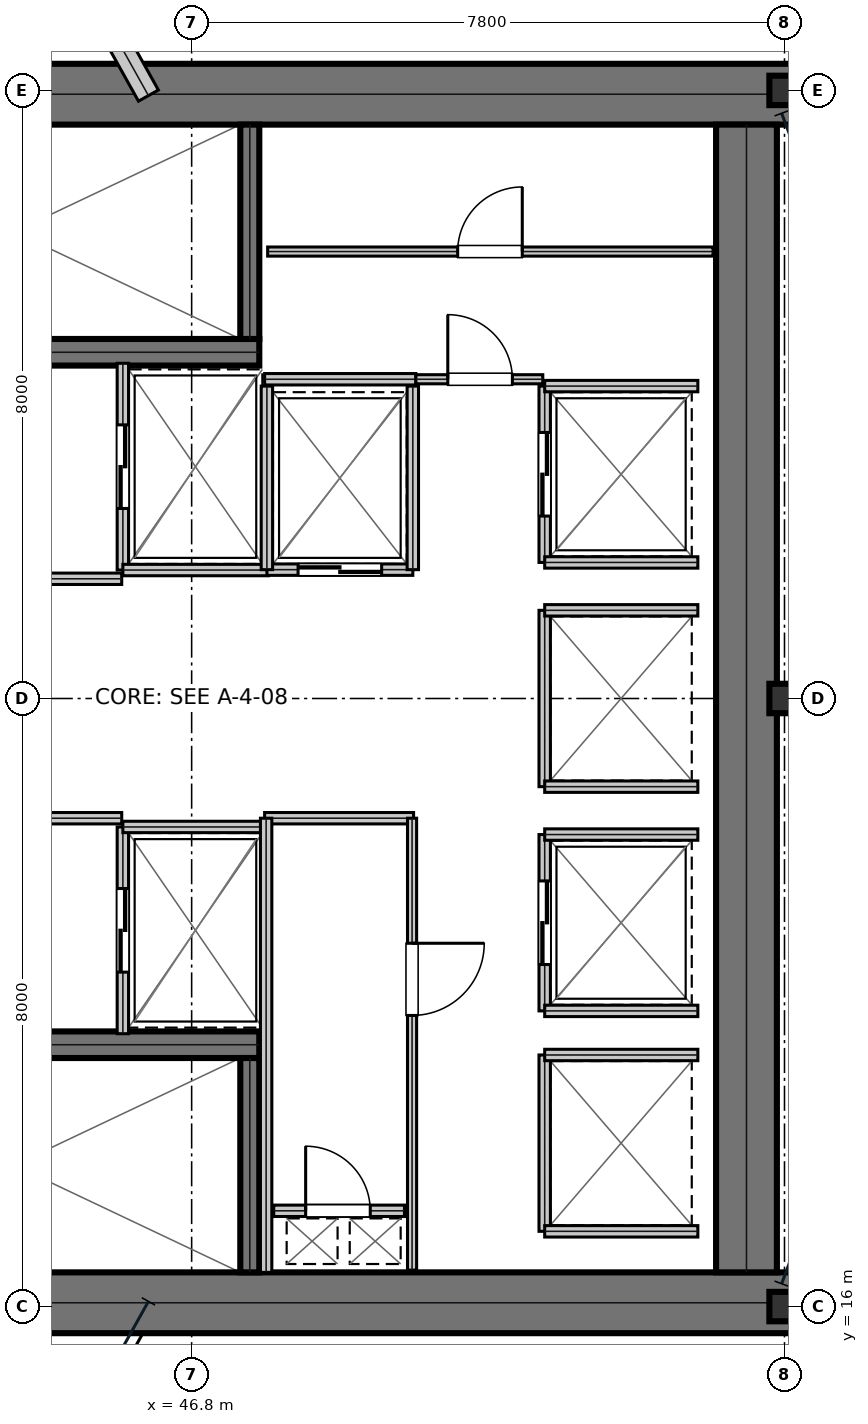
"""IFC4 building model, lengths in metres.
Left out: names, types, materials, properties, quantities, classifications, styles, units other than length and angle.
Written with IfcOpenShell. Run it as: python <this file> out.ifc"""

import sys

from ifc_helpers import new_model, si_unit, direction, frame, frame_2d, origin, origin_2d, place, context, subcontext, project, spatial, rectangle, i_section, extrude, element, fill, save


model = new_model("IFC4")
c1 = context("Model", 3, precision=1e-05, world=origin(), true_north=direction((0.0, 1.0)))
c2 = subcontext(c1, "Body", "Model", "MODEL_VIEW")
j1 = project(units=[si_unit("LENGTHUNIT", "METRE"), si_unit("PLANEANGLEUNIT", "RADIAN")], contexts=[c1])
p1 = place(None, origin())
s1 = spatial("IfcSite", under=j1, at=p1, CompositionType="ELEMENT")
p2 = place(p1, origin())
s2 = spatial("IfcBuilding", under=s1, at=p2, CompositionType="ELEMENT")
p3 = place(p2, frame((0.0, 0.0, 161.4)))
s3 = spatial("IfcBuildingStorey", under=s2, at=p3, CompositionType="ELEMENT", Elevation=161.4)
for number, where, z_axis, x_axis in (
    (1, (38.8, 31.95, 0.0), (0.0, 0.0, 1.0), (1.0, 0.0, 0.0)),
    (2, (38.8, 16.05, 0.0), (0.0, 0.0, 1.0), (1.0, 0.0, 0.0)),
):
    element("IfcWall", number, at=place(p3, frame(where, z_axis=z_axis, x_axis=x_axis)), inside=s3, PredefinedType="SHEAR", context=c2, shape_type="SweptSolid", body=[
        extrude(rectangle(XDim=16.0, YDim=0.8, at=frame_2d((8.0, 0.0))), origin(), (0.0, 0.0, 1.0), 3.81),
    ])
p4 = place(p3, frame((54.1, 16.45, 0.0), z_axis=(0.0, 0.0, 1.0), x_axis=(0.0, 1.0, 0.0)))
e3 = element("IfcWall", 3, at=p4, inside=s3, PredefinedType="SHEAR", context=c2, shape_type="SweptSolid", body=[
    extrude(rectangle(XDim=15.1, YDim=0.8, at=frame_2d((7.55, 0.0))), origin(), (0.0, 0.0, 1.0), 3.81),
])
p5 = place(p3, frame((39.98, 28.555, 0.0), z_axis=(0.0, 0.0, 1.0), x_axis=(1.0, 0.0, 0.0)))
e4 = element("IfcWall", 4, at=p5, inside=s3, PredefinedType="SHEAR", context=c2, shape_type="SweptSolid", body=[
    extrude(rectangle(XDim=7.71, YDim=0.35, at=frame_2d((3.855, 0.0))), origin(), (0.0, 0.0, 1.0), 3.81),
])
p6 = place(p5, frame((0.25, 0.0, 0.0)))
e5 = element("IfcOpeningElement", 5, at=p6, cuts=e4, PredefinedType="OPENING", context=c2, shape_type="SweptSolid", body=[
    extrude(rectangle(XDim=1.1, YDim=2.15, at=frame_2d((0.55, 1.075))), frame((0.0, 0.185, 0.0), z_axis=(0.0, -1.0, 0.0), x_axis=(1.0, 0.0, 0.0)), (0.0, 0.0, 1.0), 0.37),
])
p7 = place(p3, frame((39.98, 19.445, 0.0), z_axis=(0.0, 0.0, 1.0), x_axis=(1.0, 0.0, 0.0)))
e6 = element("IfcWall", 6, at=p7, inside=s3, PredefinedType="SHEAR", context=c2, shape_type="SweptSolid", body=[
    extrude(rectangle(XDim=7.71, YDim=0.35, at=frame_2d((3.855, 0.0))), origin(), (0.0, 0.0, 1.0), 3.81),
])
p8 = place(p7, frame((0.25, 0.0, 0.0)))
e7 = element("IfcOpeningElement", 7, at=p8, cuts=e6, PredefinedType="OPENING", context=c2, shape_type="SweptSolid", body=[
    extrude(rectangle(XDim=1.1, YDim=2.15, at=frame_2d((0.55, 1.075))), frame((0.0, 0.185, 0.0), z_axis=(0.0, -1.0, 0.0), x_axis=(1.0, 0.0, 0.0)), (0.0, 0.0, 1.0), 0.37),
])
for number, where, z_axis, x_axis in (
    (8, (47.565, 28.73, 0.0), (0.0, 0.0, 1.0), (0.0, 1.0, 0.0)),
    (9, (47.565, 16.45, 0.0), (0.0, 0.0, 1.0), (0.0, 1.0, 0.0)),
):
    element("IfcWall", number, at=place(p3, frame(where, z_axis=z_axis, x_axis=x_axis)), inside=s3, PredefinedType="SHEAR", context=c2, shape_type="SweptSolid", body=[
        extrude(rectangle(XDim=2.82, YDim=0.25, at=frame_2d((1.41, 0.0))), origin(), (0.0, 0.0, 1.0), 3.81),
    ])
for number, where, z_axis, x_axis in (
    (10, (54.6, 16.0, 0.0), (0.0, 0.0, 1.0), (1.0, 0.0, 0.0)),
    (11, (54.6, 24.0, 0.0), (0.0, 0.0, 1.0), (1.0, 0.0, 0.0)),
    (12, (54.6, 32.0, 0.0), (0.0, 0.0, 1.0), (1.0, 0.0, 0.0)),
):
    element("IfcColumn", number, at=place(p3, frame(where, z_axis=z_axis, x_axis=x_axis)), inside=s3, PredefinedType="COLUMN", context=c2, shape_type="SweptSolid", body=[
        extrude(i_section(OverallWidth=0.398, OverallDepth=0.387, WebThickness=0.021, FlangeThickness=0.033, at=origin_2d()), origin(), (0.0, 0.0, 1.0), 4.044),
    ])
p9 = place(p3, frame((46.231, 31.932, 0.0), z_axis=(0.0, 0.0, 1.0), x_axis=(-0.487234407079, 0.873271225083, 0.0)))
e13 = element("IfcWall", 13, at=p9, inside=s3, PredefinedType="STANDARD", context=c2, shape_type="SweptSolid", body=[
    extrude(rectangle(XDim=6.145, YDim=0.3, at=frame_2d((3.072, 0.0))), origin(), (0.0, 0.0, 1.0), 3.338),
])
p10 = place(p3, frame((39.98, 25.575, 0.0), z_axis=(0.0, 0.0, 1.0), x_axis=(1.0, 0.0, 0.0)))
e14 = element("IfcWall", 14, at=p10, inside=s3, PredefinedType="PARTITIONING", context=c2, shape_type="SweptSolid", body=[
    extrude(rectangle(XDim=5.9, YDim=0.15, at=frame_2d((2.95, 0.0))), origin(), (0.0, 0.0, 1.0), 3.81),
])
p11 = place(p10, frame((2.35, 0.0, 0.0)))
e15 = element("IfcOpeningElement", 15, at=p11, cuts=e14, PredefinedType="OPENING", context=c2, shape_type="SweptSolid", body=[
    extrude(rectangle(XDim=1.05, YDim=2.15, at=frame_2d((0.525, 1.075))), frame((0.0, 0.085, 0.0), z_axis=(0.0, -1.0, 0.0), x_axis=(1.0, 0.0, 0.0)), (0.0, 0.0, 1.0), 0.17),
])
p12 = place(p3, frame((39.98, 22.425, 0.0), z_axis=(0.0, 0.0, 1.0), x_axis=(1.0, 0.0, 0.0)))
e16 = element("IfcWall", 16, at=p12, inside=s3, PredefinedType="PARTITIONING", context=c2, shape_type="SweptSolid", body=[
    extrude(rectangle(XDim=5.9, YDim=0.15, at=frame_2d((2.95, 0.0))), origin(), (0.0, 0.0, 1.0), 3.81),
])
p13 = place(p12, frame((2.35, 0.0, 0.0)))
e17 = element("IfcOpeningElement", 17, at=p13, cuts=e16, PredefinedType="OPENING", context=c2, shape_type="SweptSolid", body=[
    extrude(rectangle(XDim=1.05, YDim=2.15, at=frame_2d((0.525, 1.075))), frame((0.0, 0.085, 0.0), z_axis=(0.0, -1.0, 0.0), x_axis=(1.0, 0.0, 0.0)), (0.0, 0.0, 1.0), 0.17),
])
p14 = place(p3, frame((45.895, 25.69, 0.0), z_axis=(0.0, 0.0, 1.0), x_axis=(0.0, 1.0, 0.0)))
e18 = element("IfcWall", 18, at=p14, inside=s3, PredefinedType="PARTITIONING", context=c2, shape_type="SweptSolid", body=[
    extrude(rectangle(XDim=2.72, YDim=0.15, at=frame_2d((1.36, 0.0))), origin(), (0.0, 0.0, 1.0), 3.81),
])
p15 = place(p14, frame((0.81, 0.0, 0.0)))
e19 = element("IfcOpeningElement", 19, at=p15, cuts=e18, PredefinedType="OPENING", context=c2, shape_type="SweptSolid", body=[
    extrude(rectangle(XDim=1.1, YDim=2.15, at=frame_2d((0.55, 1.075))), frame((0.0, 0.085, 0.0), z_axis=(0.0, -1.0, 0.0), x_axis=(1.0, 0.0, 0.0)), (0.0, 0.0, 1.0), 0.17),
])
p16 = place(p3, frame((45.895, 25.69, 0.0), z_axis=(0.0, 0.0, 1.0), x_axis=(1.0, 0.0, 0.0)))
e20 = element("IfcWall", 20, at=p16, inside=s3, PredefinedType="PARTITIONING", context=c2, shape_type="SweptSolid", body=[
    extrude(rectangle(XDim=1.915, YDim=0.15, at=frame_2d((0.958, 0.0))), origin(), (0.0, 0.0, 1.0), 3.81),
])
p17 = place(p3, frame((45.895, 19.59, 0.0), z_axis=(0.0, 0.0, 1.0), x_axis=(0.0, 1.0, 0.0)))
e21 = element("IfcWall", 21, at=p17, inside=s3, PredefinedType="PARTITIONING", context=c2, shape_type="SweptSolid", body=[
    extrude(rectangle(XDim=2.72, YDim=0.15, at=frame_2d((1.36, 0.0))), origin(), (0.0, 0.0, 1.0), 3.81),
])
p18 = place(p17, frame((0.81, 0.0, 0.0)))
e22 = element("IfcOpeningElement", 22, at=p18, cuts=e21, PredefinedType="OPENING", context=c2, shape_type="SweptSolid", body=[
    extrude(rectangle(XDim=1.1, YDim=2.15, at=frame_2d((0.55, 1.075))), frame((0.0, 0.085, 0.0), z_axis=(0.0, -1.0, 0.0), x_axis=(1.0, 0.0, 0.0)), (0.0, 0.0, 1.0), 0.17),
])
p19 = place(p3, frame((45.895, 22.31, 0.0), z_axis=(0.0, 0.0, 1.0), x_axis=(1.0, 0.0, 0.0)))
e23 = element("IfcWall", 23, at=p19, inside=s3, PredefinedType="PARTITIONING", context=c2, shape_type="SweptSolid", body=[
    extrude(rectangle(XDim=1.915, YDim=0.15, at=frame_2d((0.958, 0.0))), origin(), (0.0, 0.0, 1.0), 3.81),
])
p20 = place(p3, frame((47.79, 25.695, 0.0), z_axis=(0.0, 0.0, 1.0), x_axis=(1.0, 0.0, 0.0)))
e24 = element("IfcWall", 24, at=p20, inside=s3, PredefinedType="PARTITIONING", context=c2, shape_type="SweptSolid", body=[
    extrude(rectangle(XDim=1.92, YDim=0.15, at=frame_2d((0.96, 0.0))), origin(), (0.0, 0.0, 1.0), 3.81),
])
p21 = place(p20, frame((0.41, 0.0, 0.0)))
e25 = element("IfcOpeningElement", 25, at=p21, cuts=e24, PredefinedType="OPENING", context=c2, shape_type="SweptSolid", body=[
    extrude(rectangle(XDim=1.1, YDim=2.15, at=frame_2d((0.55, 1.075))), frame((0.0, 0.085, 0.0), z_axis=(0.0, -1.0, 0.0), x_axis=(1.0, 0.0, 0.0)), (0.0, 0.0, 1.0), 0.17),
])
for number, where, z_axis, x_axis in (
    (26, (47.79, 25.695, 0.0), (0.0, 0.0, 1.0), (0.0, 1.0, 0.0)),
    (27, (49.71, 25.695, 0.0), (0.0, 0.0, 1.0), (0.0, 1.0, 0.0)),
):
    element("IfcWall", number, at=place(p3, frame(where, z_axis=z_axis, x_axis=x_axis)), inside=s3, PredefinedType="PARTITIONING", context=c2, shape_type="SweptSolid", body=[
        extrude(rectangle(XDim=2.415, YDim=0.15, at=frame_2d((1.208, 0.0))), origin(), (0.0, 0.0, 1.0), 3.81),
    ])
p22 = place(p3, frame((51.445, 25.79, 0.0), z_axis=(0.0, 0.0, 1.0), x_axis=(0.0, 1.0, 0.0)))
e28 = element("IfcWall", 28, at=p22, inside=s3, PredefinedType="PARTITIONING", context=c2, shape_type="SweptSolid", body=[
    extrude(rectangle(XDim=2.32, YDim=0.15, at=frame_2d((1.16, 0.0))), origin(), (0.0, 0.0, 1.0), 3.81),
])
p23 = place(p22, frame((0.61, 0.0, 0.0)))
e29 = element("IfcOpeningElement", 29, at=p23, cuts=e28, PredefinedType="OPENING", context=c2, shape_type="SweptSolid", body=[
    extrude(rectangle(XDim=1.1, YDim=2.15, at=frame_2d((0.55, 1.075))), frame((0.0, 0.085, 0.0), z_axis=(0.0, -1.0, 0.0), x_axis=(1.0, 0.0, 0.0)), (0.0, 0.0, 1.0), 0.17),
])
for number, where, z_axis, x_axis in (
    (30, (51.445, 25.79, 0.0), (0.0, 0.0, 1.0), (1.0, 0.0, 0.0)),
    (31, (51.445, 28.11, 0.0), (0.0, 0.0, 1.0), (1.0, 0.0, 0.0)),
):
    element("IfcWall", number, at=place(p3, frame(where, z_axis=z_axis, x_axis=x_axis)), inside=s3, PredefinedType="PARTITIONING", context=c2, shape_type="SweptSolid", body=[
        extrude(rectangle(XDim=2.015, YDim=0.15, at=frame_2d((1.007, 0.0))), origin(), (0.0, 0.0, 1.0), 3.81),
    ])
p24 = place(p3, frame((51.445, 19.89, 0.0), z_axis=(0.0, 0.0, 1.0), x_axis=(0.0, 1.0, 0.0)))
e32 = element("IfcWall", 32, at=p24, inside=s3, PredefinedType="PARTITIONING", context=c2, shape_type="SweptSolid", body=[
    extrude(rectangle(XDim=2.32, YDim=0.15, at=frame_2d((1.16, 0.0))), origin(), (0.0, 0.0, 1.0), 3.81),
])
p25 = place(p24, frame((0.61, 0.0, 0.0)))
e33 = element("IfcOpeningElement", 33, at=p25, cuts=e32, PredefinedType="OPENING", context=c2, shape_type="SweptSolid", body=[
    extrude(rectangle(XDim=1.1, YDim=2.15, at=frame_2d((0.55, 1.075))), frame((0.0, 0.085, 0.0), z_axis=(0.0, -1.0, 0.0), x_axis=(1.0, 0.0, 0.0)), (0.0, 0.0, 1.0), 0.17),
])
for number, where, z_axis, x_axis in (
    (34, (51.445, 19.89, 0.0), (0.0, 0.0, 1.0), (1.0, 0.0, 0.0)),
    (35, (51.445, 22.21, 0.0), (0.0, 0.0, 1.0), (1.0, 0.0, 0.0)),
):
    element("IfcWall", number, at=place(p3, frame(where, z_axis=z_axis, x_axis=x_axis)), inside=s3, PredefinedType="PARTITIONING", context=c2, shape_type="SweptSolid", body=[
        extrude(rectangle(XDim=2.015, YDim=0.15, at=frame_2d((1.007, 0.0))), origin(), (0.0, 0.0, 1.0), 3.81),
    ])
p26 = place(p3, frame((51.445, 22.84, 0.0), z_axis=(0.0, 0.0, 1.0), x_axis=(0.0, 1.0, 0.0)))
e36 = element("IfcWall", 36, at=p26, inside=s3, PredefinedType="PARTITIONING", context=c2, shape_type="SweptSolid", body=[
    extrude(rectangle(XDim=2.32, YDim=0.15, at=frame_2d((1.16, 0.0))), origin(), (0.0, 0.0, 1.0), 3.81),
])
for number, where, z_axis, x_axis in (
    (37, (51.445, 22.84, 0.0), (0.0, 0.0, 1.0), (1.0, 0.0, 0.0)),
    (38, (51.445, 25.16, 0.0), (0.0, 0.0, 1.0), (1.0, 0.0, 0.0)),
):
    element("IfcWall", number, at=place(p3, frame(where, z_axis=z_axis, x_axis=x_axis)), inside=s3, PredefinedType="PARTITIONING", context=c2, shape_type="SweptSolid", body=[
        extrude(rectangle(XDim=2.015, YDim=0.15, at=frame_2d((1.007, 0.0))), origin(), (0.0, 0.0, 1.0), 3.81),
    ])
p27 = place(p3, frame((51.445, 16.99, 0.0), z_axis=(0.0, 0.0, 1.0), x_axis=(0.0, 1.0, 0.0)))
e39 = element("IfcWall", 39, at=p27, inside=s3, PredefinedType="PARTITIONING", context=c2, shape_type="SweptSolid", body=[
    extrude(rectangle(XDim=2.32, YDim=0.15, at=frame_2d((1.16, 0.0))), origin(), (0.0, 0.0, 1.0), 3.81),
])
for number, where, z_axis, x_axis in (
    (40, (51.445, 16.99, 0.0), (0.0, 0.0, 1.0), (1.0, 0.0, 0.0)),
    (41, (51.445, 19.31, 0.0), (0.0, 0.0, 1.0), (1.0, 0.0, 0.0)),
):
    element("IfcWall", number, at=place(p3, frame(where, z_axis=z_axis, x_axis=x_axis)), inside=s3, PredefinedType="PARTITIONING", context=c2, shape_type="SweptSolid", body=[
        extrude(rectangle(XDim=2.015, YDim=0.15, at=frame_2d((1.007, 0.0))), origin(), (0.0, 0.0, 1.0), 3.81),
    ])
p28 = place(p3, frame((47.88, 17.26, 0.0), z_axis=(0.0, 0.0, 1.0), x_axis=(1.0, 0.0, 0.0)))
e42 = element("IfcWall", 42, at=p28, inside=s3, PredefinedType="PARTITIONING", context=c2, shape_type="SweptSolid", body=[
    extrude(rectangle(XDim=1.72, YDim=0.15, at=frame_2d((0.86, 0.0))), origin(), (0.0, 0.0, 1.0), 3.81),
])
p29 = place(p28, frame((0.42, 0.0, 0.0)))
e43 = element("IfcOpeningElement", 43, at=p29, cuts=e42, PredefinedType="OPENING", context=c2, shape_type="SweptSolid", body=[
    extrude(rectangle(XDim=0.85, YDim=2.15, at=frame_2d((0.425, 1.075))), frame((0.0, 0.085, 0.0), z_axis=(0.0, -1.0, 0.0), x_axis=(1.0, 0.0, 0.0)), (0.0, 0.0, 1.0), 0.17),
])
p30 = place(p3, frame((47.76, 22.425, 0.0), z_axis=(0.0, 0.0, 1.0), x_axis=(1.0, 0.0, 0.0)))
e44 = element("IfcWall", 44, at=p30, inside=s3, PredefinedType="PARTITIONING", context=c2, shape_type="SweptSolid", body=[
    extrude(rectangle(XDim=1.96, YDim=0.15, at=frame_2d((0.98, 0.0))), origin(), (0.0, 0.0, 1.0), 3.81),
])
p31 = place(p3, frame((47.78, 16.45, 0.0), z_axis=(0.0, 0.0, 1.0), x_axis=(0.0, 1.0, 0.0)))
e45 = element("IfcWall", 45, at=p31, inside=s3, PredefinedType="PARTITIONING", context=c2, shape_type="SweptSolid", body=[
    extrude(rectangle(XDim=5.975, YDim=0.15, at=frame_2d((2.988, 0.0))), origin(), (0.0, 0.0, 1.0), 3.81),
])
p32 = place(p3, frame((49.7, 16.48, 0.0), z_axis=(0.0, 0.0, 1.0), x_axis=(0.0, 1.0, 0.0)))
e46 = element("IfcWall", 46, at=p32, inside=s3, PredefinedType="PARTITIONING", context=c2, shape_type="SweptSolid", body=[
    extrude(rectangle(XDim=5.945, YDim=0.12, at=frame_2d((2.973, 0.0))), origin(), (0.0, 0.0, 1.0), 3.81),
])
p33 = place(p32, frame((3.35, 0.0, 0.0)))
e47 = element("IfcOpeningElement", 47, at=p33, cuts=e46, PredefinedType="OPENING", context=c2, shape_type="SweptSolid", body=[
    extrude(rectangle(XDim=0.95, YDim=2.15, at=frame_2d((0.475, 1.075))), frame((0.0, 0.07, 0.0), z_axis=(0.0, -1.0, 0.0), x_axis=(1.0, 0.0, 0.0)), (0.0, 0.0, 1.0), 0.14),
])
p34 = place(p3, frame((47.76, 28.2, 0.0), z_axis=(0.0, 0.0, 1.0), x_axis=(1.0, 0.0, 0.0)))
e48 = element("IfcWall", 48, at=p34, inside=s3, PredefinedType="PARTITIONING", context=c2, shape_type="SweptSolid", body=[
    extrude(rectangle(XDim=1.99, YDim=0.15, at=frame_2d((0.995, 0.0))), origin(), (0.0, 0.0, 1.0), 3.81),
])
p35 = place(p3, frame((49.75, 28.2, 0.0), z_axis=(0.0, 0.0, 1.0), x_axis=(1.0, 0.0, 0.0)))
e49 = element("IfcWall", 49, at=p35, inside=s3, PredefinedType="PARTITIONING", context=c2, shape_type="SweptSolid", body=[
    extrude(rectangle(XDim=1.67, YDim=0.12, at=frame_2d((0.835, 0.0))), origin(), (0.0, 0.0, 1.0), 3.81),
])
p36 = place(p35, frame((0.42, 0.0, 0.0)))
e50 = element("IfcOpeningElement", 50, at=p36, cuts=e49, PredefinedType="OPENING", context=c2, shape_type="SweptSolid", body=[
    extrude(rectangle(XDim=0.85, YDim=2.15, at=frame_2d((0.425, 1.075))), frame((0.0, 0.07, 0.0), z_axis=(0.0, -1.0, 0.0), x_axis=(1.0, 0.0, 0.0)), (0.0, 0.0, 1.0), 0.14),
])
p37 = place(p3, frame((47.8, 29.88, 0.0), z_axis=(0.0, 0.0, 1.0), x_axis=(1.0, 0.0, 0.0)))
e51 = element("IfcWall", 51, at=p37, inside=s3, PredefinedType="PARTITIONING", context=c2, shape_type="SweptSolid", body=[
    extrude(rectangle(XDim=5.86, YDim=0.12, at=frame_2d((2.93, 0.0))), origin(), (0.0, 0.0, 1.0), 3.81),
])
p38 = place(p37, frame((2.5, 0.0, 0.0)))
e52 = element("IfcOpeningElement", 52, at=p38, cuts=e51, PredefinedType="OPENING", context=c2, shape_type="SweptSolid", body=[
    extrude(rectangle(XDim=0.85, YDim=2.15, at=frame_2d((0.425, 1.075))), frame((0.0, 0.07, 0.0), z_axis=(0.0, -1.0, 0.0), x_axis=(1.0, 0.0, 0.0)), (0.0, 0.0, 1.0), 0.14),
])
p39 = place(p15, frame((1.1, 0.0, 0.0), z_axis=(0.0, 0.0, 1.0), x_axis=(-1.0, 0.0, 0.0)))
e53 = element("IfcDoor", 53, at=p39, inside=s3, OperationType="DOUBLE_DOOR_SLIDING", PredefinedType="DOOR", context=c2, shape_type="SweptSolid", body=[
    extrude(rectangle(XDim=1.1, YDim=2.15, at=frame_2d((0.55, 1.075))), frame((0.0, 0.025, 0.0), z_axis=(0.0, -1.0, 0.0), x_axis=(1.0, 0.0, 0.0)), (0.0, 0.0, 1.0), 0.05),
])
fill(e19, e53)
p40 = place(p18, frame((1.1, 0.0, 0.0), z_axis=(0.0, 0.0, 1.0), x_axis=(-1.0, 0.0, 0.0)))
e54 = element("IfcDoor", 54, at=p40, inside=s3, OperationType="DOUBLE_DOOR_SLIDING", PredefinedType="DOOR", context=c2, shape_type="SweptSolid", body=[
    extrude(rectangle(XDim=1.1, YDim=2.15, at=frame_2d((0.55, 1.075))), frame((0.0, 0.025, 0.0), z_axis=(0.0, -1.0, 0.0), x_axis=(1.0, 0.0, 0.0)), (0.0, 0.0, 1.0), 0.05),
])
fill(e22, e54)
p41 = place(p21, frame((1.1, 0.0, 0.0), z_axis=(0.0, 0.0, 1.0), x_axis=(-1.0, 0.0, 0.0)))
e55 = element("IfcDoor", 55, at=p41, inside=s3, OperationType="DOUBLE_DOOR_SLIDING", PredefinedType="DOOR", context=c2, shape_type="SweptSolid", body=[
    extrude(rectangle(XDim=1.1, YDim=2.15, at=frame_2d((0.55, 1.075))), frame((0.0, 0.025, 0.0), z_axis=(0.0, -1.0, 0.0), x_axis=(1.0, 0.0, 0.0)), (0.0, 0.0, 1.0), 0.05),
])
fill(e25, e55)
p42 = place(p23, frame((1.1, 0.0, 0.0), z_axis=(0.0, 0.0, 1.0), x_axis=(-1.0, 0.0, 0.0)))
e56 = element("IfcDoor", 56, at=p42, inside=s3, OperationType="DOUBLE_DOOR_SLIDING", PredefinedType="DOOR", context=c2, shape_type="SweptSolid", body=[
    extrude(rectangle(XDim=1.1, YDim=2.15, at=frame_2d((0.55, 1.075))), frame((0.0, 0.025, 0.0), z_axis=(0.0, -1.0, 0.0), x_axis=(1.0, 0.0, 0.0)), (0.0, 0.0, 1.0), 0.05),
])
fill(e29, e56)
p43 = place(p25, frame((1.1, 0.0, 0.0), z_axis=(0.0, 0.0, 1.0), x_axis=(-1.0, 0.0, 0.0)))
e57 = element("IfcDoor", 57, at=p43, inside=s3, OperationType="DOUBLE_DOOR_SLIDING", PredefinedType="DOOR", context=c2, shape_type="SweptSolid", body=[
    extrude(rectangle(XDim=1.1, YDim=2.15, at=frame_2d((0.55, 1.075))), frame((0.0, 0.025, 0.0), z_axis=(0.0, -1.0, 0.0), x_axis=(1.0, 0.0, 0.0)), (0.0, 0.0, 1.0), 0.05),
])
fill(e33, e57)
p44 = place(p29, origin())
e58 = element("IfcDoor", 58, at=p44, inside=s3, OperationType="SINGLE_SWING_LEFT", PredefinedType="TRAPDOOR", context=c2, shape_type="SweptSolid", body=[
    extrude(rectangle(XDim=0.85, YDim=2.15, at=frame_2d((0.425, 1.075))), frame((0.0, 0.025, 0.0), z_axis=(0.0, -1.0, 0.0), x_axis=(1.0, 0.0, 0.0)), (0.0, 0.0, 1.0), 0.05),
])
fill(e43, e58)
p45 = place(p33, frame((0.95, 0.0, 0.0), z_axis=(0.0, 0.0, 1.0), x_axis=(-1.0, 0.0, 0.0)))
e59 = element("IfcDoor", 59, at=p45, inside=s3, OperationType="SINGLE_SWING_LEFT", PredefinedType="DOOR", context=c2, shape_type="SweptSolid", body=[
    extrude(rectangle(XDim=0.95, YDim=2.15, at=frame_2d((0.475, 1.075))), frame((0.0, 0.025, 0.0), z_axis=(0.0, -1.0, 0.0), x_axis=(1.0, 0.0, 0.0)), (0.0, 0.0, 1.0), 0.05),
])
fill(e47, e59)
p46 = place(p36, origin())
e60 = element("IfcDoor", 60, at=p46, inside=s3, OperationType="SINGLE_SWING_LEFT", PredefinedType="DOOR", context=c2, shape_type="SweptSolid", body=[
    extrude(rectangle(XDim=0.85, YDim=2.15, at=frame_2d((0.425, 1.075))), frame((0.0, 0.025, 0.0), z_axis=(0.0, -1.0, 0.0), x_axis=(1.0, 0.0, 0.0)), (0.0, 0.0, 1.0), 0.05),
])
fill(e50, e60)
p47 = place(p38, origin())
e61 = element("IfcDoor", 61, at=p47, inside=s3, OperationType="SINGLE_SWING_RIGHT", PredefinedType="DOOR", context=c2, shape_type="SweptSolid", body=[
    extrude(rectangle(XDim=0.85, YDim=2.15, at=frame_2d((0.425, 1.075))), frame((0.0, 0.025, 0.0), z_axis=(0.0, -1.0, 0.0), x_axis=(1.0, 0.0, 0.0)), (0.0, 0.0, 1.0), 0.05),
])
fill(e52, e61)
save(model, sys.argv[1])
